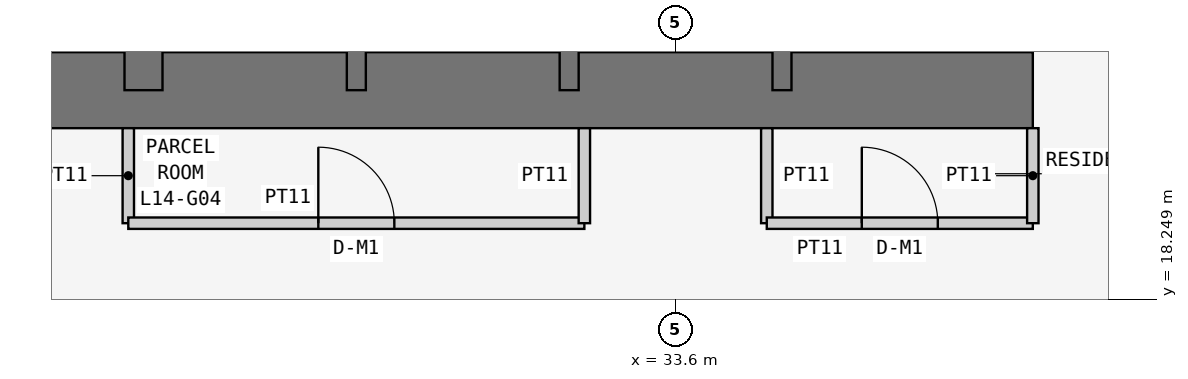
"""IFC4 building model, lengths in metres.
Left out: names, types, materials, properties, quantities, classifications, styles, units other than length and angle.
Written with IfcOpenShell. Run it as: python <this file> out.ifc"""

import sys

from ifc_helpers import new_model, si_unit, direction, frame, frame_2d, origin, place, context, subcontext, project, spatial, rectangle, extrude, element, fill, save


model = new_model("IFC4")
c1 = context("Model", 3, precision=1e-05, world=origin(), true_north=direction((0.0, 1.0)))
c2 = subcontext(c1, "Body", "Model", "MODEL_VIEW")
j1 = project(units=[si_unit("LENGTHUNIT", "METRE"), si_unit("PLANEANGLEUNIT", "RADIAN")], contexts=[c1])
p1 = place(None, origin())
s1 = spatial("IfcSite", under=j1, at=p1, CompositionType="ELEMENT")
p2 = place(p1, origin())
s2 = spatial("IfcBuilding", under=s1, at=p2, CompositionType="ELEMENT")
p3 = place(p2, frame((0.0, 0.0, 59.7)))
s3 = spatial("IfcBuildingStorey", under=s2, at=p3, CompositionType="ELEMENT", Elevation=59.7)
p4 = place(p3, frame((21.0, 21.0, 0.0), z_axis=(0.0, 0.0, 1.0), x_axis=(1.0, 0.0, 0.0)))
e1 = element("IfcWall", 1, at=p4, inside=s3, PredefinedType="SHEAR", context=c2, shape_type="SweptSolid", body=[
    extrude(rectangle(XDim=17.3, YDim=1.0, at=frame_2d((8.65, 0.0))), origin(), (0.0, 0.0, 1.0), 3.6),
])
p5 = place(p3, frame((37.8, 21.0, 0.0), z_axis=(0.0, 0.0, 1.0), x_axis=(0.0, 1.0, 0.0)))
e2 = element("IfcWall", 2, at=p5, inside=s3, PredefinedType="SHEAR", context=c2, shape_type="SweptSolid", body=[
    extrude(rectangle(XDim=17.3, YDim=1.0, at=frame_2d((8.65, 0.0))), origin(), (0.0, 0.0, 1.0), 3.6),
])
p6 = place(p5, frame((5.2, 0.0, 0.0)))
e3 = element("IfcOpeningElement", 3, at=p6, cuts=e2, PredefinedType="OPENING", context=c2, shape_type="SweptSolid", body=[
    extrude(rectangle(XDim=1.2, YDim=2.1, at=frame_2d((0.6, 1.05))), frame((0.0, 0.51, 0.0), z_axis=(0.0, -1.0, 0.0), x_axis=(1.0, 0.0, 0.0)), (0.0, 0.0, 1.0), 1.02),
])
p7 = place(p3, frame((26.6, 21.0, 0.0), z_axis=(0.0, 0.0, 1.0), x_axis=(0.0, 1.0, 0.0)))
e4 = element("IfcWall", 4, at=p7, inside=s3, PredefinedType="SHEAR", context=c2, shape_type="SweptSolid", body=[
    extrude(rectangle(XDim=16.8, YDim=0.5, at=frame_2d((8.4, 0.0))), origin(), (0.0, 0.0, 1.0), 3.6),
])
p8 = place(p7, frame((10.4, 0.0, 0.0)))
e5 = element("IfcOpeningElement", 5, at=p8, cuts=e4, PredefinedType="OPENING", context=c2, shape_type="SweptSolid", body=[
    extrude(rectangle(XDim=1.2, YDim=2.1, at=frame_2d((0.6, 1.05))), frame((0.0, 0.26, 0.0), z_axis=(0.0, -1.0, 0.0), x_axis=(1.0, 0.0, 0.0)), (0.0, 0.0, 1.0), 0.52),
])
for number, where, z_axis, x_axis in (
    (6, (29.4, 21.0, 0.0), (0.0, 0.0, 1.0), (0.0, 1.0, 0.0)),
    (7, (32.2, 21.0, 0.0), (0.0, 0.0, 1.0), (0.0, 1.0, 0.0)),
    (8, (35.0, 21.0, 0.0), (0.0, 0.0, 1.0), (0.0, 1.0, 0.0)),
):
    element("IfcWall", number, at=place(p3, frame(where, z_axis=z_axis, x_axis=x_axis)), inside=s3, PredefinedType="SHEAR", context=c2, shape_type="SweptSolid", body=[
        extrude(rectangle(XDim=3.2, YDim=0.25, at=frame_2d((1.6, 0.0))), origin(), (0.0, 0.0, 1.0), 3.6),
    ])
p9 = place(p3, frame((26.4, 20.5, 0.0), z_axis=(0.0, 0.0, 1.0), x_axis=(0.0, -1.0, 0.0)))
e9 = element("IfcWall", 9, at=p9, inside=s3, PredefinedType="PARTITIONING", context=c2, shape_type="SweptSolid", body=[
    extrude(rectangle(XDim=1.25, YDim=0.15, at=frame_2d((0.625, 0.0))), origin(), (0.0, 0.0, 1.0), 3.45),
])
p10 = place(p3, frame((26.4, 19.25, 0.0), z_axis=(0.0, 0.0, 1.0), x_axis=(1.0, 0.0, 0.0)))
e10 = element("IfcWall", 10, at=p10, inside=s3, PredefinedType="PARTITIONING", context=c2, shape_type="SweptSolid", body=[
    extrude(rectangle(XDim=6.0, YDim=0.15, at=frame_2d((3.0, 0.0))), origin(), (0.0, 0.0, 1.0), 3.45),
])
p11 = place(p10, frame((2.5, 0.0, 0.0)))
e11 = element("IfcOpeningElement", 11, at=p11, cuts=e10, PredefinedType="OPENING", context=c2, shape_type="SweptSolid", body=[
    extrude(rectangle(XDim=1.0, YDim=2.1, at=frame_2d((0.5, 1.05))), frame((0.0, 0.085, 0.0), z_axis=(0.0, -1.0, 0.0), x_axis=(1.0, 0.0, 0.0)), (0.0, 0.0, 1.0), 0.17),
])
for number, where, z_axis, x_axis in (
    (12, (32.4, 19.25, 0.0), (0.0, 0.0, 1.0), (0.0, 1.0, 0.0)),
    (13, (34.8, 20.5, 0.0), (0.0, 0.0, 1.0), (0.0, -1.0, 0.0)),
):
    element("IfcWall", number, at=place(p3, frame(where, z_axis=z_axis, x_axis=x_axis)), inside=s3, PredefinedType="PARTITIONING", context=c2, shape_type="SweptSolid", body=[
        extrude(rectangle(XDim=1.25, YDim=0.15, at=frame_2d((0.625, 0.0))), origin(), (0.0, 0.0, 1.0), 3.45),
    ])
p12 = place(p3, frame((34.8, 19.25, 0.0), z_axis=(0.0, 0.0, 1.0), x_axis=(1.0, 0.0, 0.0)))
e14 = element("IfcWall", 14, at=p12, inside=s3, PredefinedType="PARTITIONING", context=c2, shape_type="SweptSolid", body=[
    extrude(rectangle(XDim=3.5, YDim=0.15, at=frame_2d((1.75, 0.0))), origin(), (0.0, 0.0, 1.0), 3.45),
])
p13 = place(p12, frame((1.25, 0.0, 0.0)))
e15 = element("IfcOpeningElement", 15, at=p13, cuts=e14, PredefinedType="OPENING", context=c2, shape_type="SweptSolid", body=[
    extrude(rectangle(XDim=1.0, YDim=2.1, at=frame_2d((0.5, 1.05))), frame((0.0, 0.085, 0.0), z_axis=(0.0, -1.0, 0.0), x_axis=(1.0, 0.0, 0.0)), (0.0, 0.0, 1.0), 0.17),
])
p14 = place(p3, frame((38.3, 19.25, 0.0), z_axis=(0.0, 0.0, 1.0), x_axis=(0.0, 1.0, 0.0)))
e16 = element("IfcWall", 16, at=p14, inside=s3, PredefinedType="PARTITIONING", context=c2, shape_type="SweptSolid", body=[
    extrude(rectangle(XDim=1.25, YDim=0.15, at=frame_2d((0.625, 0.0))), origin(), (0.0, 0.0, 1.0), 3.45),
])
p15 = place(p11, origin())
e17 = element("IfcDoor", 17, at=p15, inside=s3, OperationType="SINGLE_SWING_LEFT", PredefinedType="DOOR", context=c2, shape_type="SweptSolid", body=[
    extrude(rectangle(XDim=1.0, YDim=2.1, at=frame_2d((0.5, 1.05))), frame((0.0, 0.025, 0.0), z_axis=(0.0, -1.0, 0.0), x_axis=(1.0, 0.0, 0.0)), (0.0, 0.0, 1.0), 0.05),
])
fill(e11, e17)
p16 = place(p13, origin())
e18 = element("IfcDoor", 18, at=p16, inside=s3, OperationType="SINGLE_SWING_LEFT", PredefinedType="DOOR", context=c2, shape_type="SweptSolid", body=[
    extrude(rectangle(XDim=1.0, YDim=2.1, at=frame_2d((0.5, 1.05))), frame((0.0, 0.025, 0.0), z_axis=(0.0, -1.0, 0.0), x_axis=(1.0, 0.0, 0.0)), (0.0, 0.0, 1.0), 0.05),
])
fill(e15, e18)
save(model, sys.argv[1])
